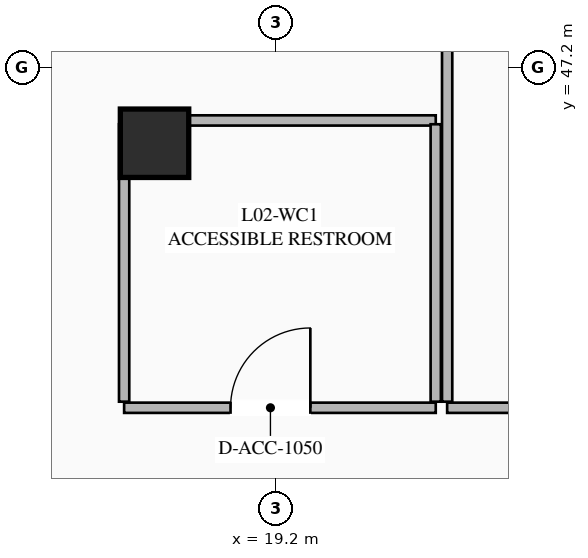
"""IFC4 building model, lengths in metres.
Left out: names, types, materials, properties, quantities, classifications, styles, units other than length and angle.
Written with IfcOpenShell. Run it as: python <this file> out.ifc"""

import sys

from ifc_helpers import new_model, si_unit, direction, frame, frame_2d, origin, origin_2d, place, context, subcontext, project, spatial, rectangle, extrude, element, fill, save


model = new_model("IFC4")
c1 = context("Model", 3, precision=1e-05, world=origin(), true_north=direction((0.0, 1.0)))
c2 = subcontext(c1, "Body", "Model", "MODEL_VIEW")
j1 = project(units=[si_unit("LENGTHUNIT", "METRE"), si_unit("PLANEANGLEUNIT", "RADIAN")], contexts=[c1])
p1 = place(None, origin())
s1 = spatial("IfcSite", under=j1, at=p1, CompositionType="ELEMENT")
p2 = place(p1, origin())
s2 = spatial("IfcBuilding", under=s1, at=p2, CompositionType="ELEMENT")
p3 = place(p2, frame((0.0, 0.0, 10.2)))
s3 = spatial("IfcBuildingStorey", under=s2, at=p3, CompositionType="ELEMENT", Elevation=10.2)
p4 = place(p3, frame((17.6, 46.2, 0.0), z_axis=(0.0, 0.0, 1.0), x_axis=(1.0, 0.0, 0.0)))
e1 = element("IfcColumn", 1, at=p4, inside=s3, PredefinedType="COLUMN", context=c2, shape_type="SweptSolid", body=[
    extrude(rectangle(XDim=0.9, YDim=0.9, at=origin_2d()), origin(), (0.0, 0.0, 1.0), 5.14),
])
p5 = place(p3, frame((21.45, 42.72, 0.0), z_axis=(0.0, 0.0, 1.0), x_axis=(1.0, 0.0, 0.0)))
e2 = element("IfcWall", 2, at=p5, inside=s3, PredefinedType="PARTITIONING", context=c2, shape_type="SweptSolid", body=[
    extrude(rectangle(XDim=50.75, YDim=0.135, at=frame_2d((25.375, 0.0))), origin(), (0.0, 0.0, 1.0), 2.71),
])
p6 = place(p5, frame((6.0, 0.0, 0.0)))
e3 = element("IfcOpeningElement", 3, at=p6, cuts=e2, PredefinedType="OPENING", context=c2, shape_type="SweptSolid", body=[
    extrude(rectangle(XDim=1.6, YDim=2.25, at=frame_2d((0.8, 1.125))), frame((0.0, 0.077, 0.0), z_axis=(0.0, -1.0, 0.0), x_axis=(1.0, 0.0, 0.0)), (0.0, 0.0, 1.0), 0.155),
])
p7 = place(p5, frame((36.0, 0.0, 0.0)))
e4 = element("IfcOpeningElement", 4, at=p7, cuts=e2, PredefinedType="OPENING", context=c2, shape_type="SweptSolid", body=[
    extrude(rectangle(XDim=0.95, YDim=2.05, at=frame_2d((0.475, 1.025))), frame((0.0, 0.077, 0.0), z_axis=(0.0, -1.0, 0.0), x_axis=(1.0, 0.0, 0.0)), (0.0, 0.0, 1.0), 0.155),
])
p8 = place(p3, frame((21.45, 42.8, 0.0), z_axis=(0.0, 0.0, 1.0), x_axis=(0.0, 1.0, 0.0)))
e5 = element("IfcWall", 5, at=p8, inside=s3, PredefinedType="PARTITIONING", context=c2, shape_type="SweptSolid", body=[
    extrude(rectangle(XDim=20.85, YDim=0.135, at=frame_2d((10.425, 0.0))), origin(), (0.0, 0.0, 1.0), 2.71),
])
p9 = place(p3, frame((17.2, 42.72, 0.0), z_axis=(0.0, 0.0, 1.0), x_axis=(1.0, 0.0, 0.0)))
e6 = element("IfcWall", 6, at=p9, inside=s3, PredefinedType="PARTITIONING", context=c2, shape_type="SweptSolid", body=[
    extrude(rectangle(XDim=4.1, YDim=0.135, at=frame_2d((2.05, 0.0))), origin(), (0.0, 0.0, 1.0), 2.71),
])
p10 = place(p9, frame((1.4, 0.0, 0.0)))
e7 = element("IfcOpeningElement", 7, at=p10, cuts=e6, PredefinedType="OPENING", context=c2, shape_type="SweptSolid", body=[
    extrude(rectangle(XDim=1.05, YDim=2.2, at=frame_2d((0.525, 1.1))), frame((0.0, 0.077, 0.0), z_axis=(0.0, -1.0, 0.0), x_axis=(1.0, 0.0, 0.0)), (0.0, 0.0, 1.0), 0.155),
])
p11 = place(p3, frame((17.2, 46.5, 0.0), z_axis=(0.0, 0.0, 1.0), x_axis=(1.0, 0.0, 0.0)))
e8 = element("IfcWall", 8, at=p11, inside=s3, PredefinedType="PARTITIONING", context=c2, shape_type="SweptSolid", body=[
    extrude(rectangle(XDim=4.1, YDim=0.135, at=frame_2d((2.05, 0.0))), origin(), (0.0, 0.0, 1.0), 2.71),
])
for number, where, z_axis, x_axis in (
    (9, (17.2, 42.8, 0.0), (0.0, 0.0, 1.0), (0.0, 1.0, 0.0)),
    (10, (21.3, 42.8, 0.0), (0.0, 0.0, 1.0), (0.0, 1.0, 0.0)),
):
    element("IfcWall", number, at=place(p3, frame(where, z_axis=z_axis, x_axis=x_axis)), inside=s3, PredefinedType="PARTITIONING", context=c2, shape_type="SweptSolid", body=[
        extrude(rectangle(XDim=3.65, YDim=0.135, at=frame_2d((1.825, 0.0))), origin(), (0.0, 0.0, 1.0), 2.71),
    ])
p12 = place(p10, origin())
e11 = element("IfcDoor", 11, at=p12, inside=s3, OperationType="SINGLE_SWING_RIGHT", PredefinedType="DOOR", context=c2, shape_type="SweptSolid", body=[
    extrude(rectangle(XDim=1.05, YDim=2.2, at=frame_2d((0.525, 1.1))), frame((0.0, 0.025, 0.0), z_axis=(0.0, -1.0, 0.0), x_axis=(1.0, 0.0, 0.0)), (0.0, 0.0, 1.0), 0.05),
])
fill(e7, e11)
save(model, sys.argv[1])
